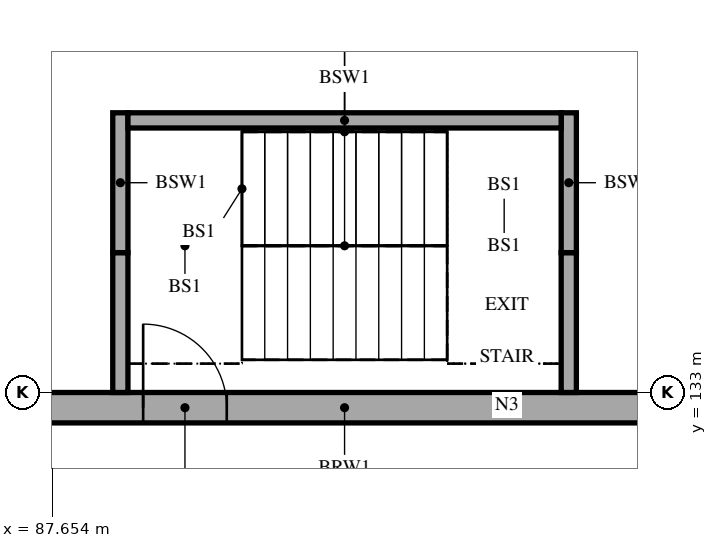
"""IFC4 building model, lengths in metres.
Left out: names, types, materials, properties, quantities, classifications, styles, units other than length and angle.
Written with IfcOpenShell. Run it as: python <this file> out.ifc"""

import sys

from ifc_helpers import new_model, si_unit, direction, frame, frame_2d, origin, place, context, subcontext, project, spatial, rectangle, extrude, element, fill, save


model = new_model("IFC4")
c1 = context("Model", 3, precision=1e-05, world=origin(), true_north=direction((0.0, 1.0)))
c2 = subcontext(c1, "Body", "Model", "MODEL_VIEW")
j1 = project(units=[si_unit("LENGTHUNIT", "METRE"), si_unit("PLANEANGLEUNIT", "RADIAN")], contexts=[c1])
p1 = place(None, origin())
s1 = spatial("IfcSite", under=j1, at=p1, CompositionType="ELEMENT")
p2 = place(p1, origin())
s2 = spatial("IfcBuilding", under=s1, at=p2, CompositionType="ELEMENT")
p3 = place(p2, frame((0.0, 0.0, -4.2)))
s3 = spatial("IfcBuildingStorey", under=s2, at=p3, CompositionType="ELEMENT", Elevation=-4.2)
p4 = place(p3, frame((87.4, 132.8, 0.0), z_axis=(0.0, 0.0, 1.0), x_axis=(1.0, 0.0, 0.0)))
e1 = element("IfcWall", 1, at=p4, inside=s3, PredefinedType="SOLIDWALL", context=c2, shape_type="SweptSolid", body=[
    extrude(rectangle(XDim=8.2, YDim=0.4, at=frame_2d((4.1, 0.0))), origin(), (0.0, 0.0, 1.0), 4.2),
])
p5 = place(p4, frame((1.45, 0.0, 0.0)))
e2 = element("IfcOpeningElement", 2, at=p5, cuts=e1, PredefinedType="OPENING", context=c2, shape_type="SweptSolid", body=[
    extrude(rectangle(XDim=1.1, YDim=2.1, at=frame_2d((0.55, 1.05))), frame((0.0, 0.21, 0.0), z_axis=(0.0, -1.0, 0.0), x_axis=(1.0, 0.0, 0.0)), (0.0, 0.0, 1.0), 0.42),
])
p6 = place(p3, frame((94.45, 133.0, 0.0), z_axis=(0.0, 0.0, 1.0), x_axis=(0.0, 1.0, 0.0)))
e3 = element("IfcWall", 3, at=p6, inside=s3, PredefinedType="SOLIDWALL", context=c2, shape_type="SweptSolid", body=[
    extrude(rectangle(XDim=1.84, YDim=0.2, at=frame_2d((0.92, 0.0))), origin(), (0.0, 0.0, 1.0), 4.2),
])
p7 = place(p3, frame((94.45, 134.84, 0.0), z_axis=(0.0, 0.0, 1.0), x_axis=(0.0, 1.0, 0.0)))
e4 = element("IfcWall", 4, at=p7, inside=s3, PredefinedType="SOLIDWALL", context=c2, shape_type="SweptSolid", body=[
    extrude(rectangle(XDim=1.84, YDim=0.2, at=frame_2d((0.92, 0.0))), origin(), (0.0, 0.0, 1.0), 4.2),
])
p8 = place(p3, frame((88.55, 133.0, 0.0), z_axis=(0.0, 0.0, 1.0), x_axis=(0.0, 1.0, 0.0)))
e5 = element("IfcWall", 5, at=p8, inside=s3, PredefinedType="SOLIDWALL", context=c2, shape_type="SweptSolid", body=[
    extrude(rectangle(XDim=1.84, YDim=0.2, at=frame_2d((0.92, 0.0))), origin(), (0.0, 0.0, 1.0), 4.2),
])
p9 = place(p3, frame((88.55, 134.84, 0.0), z_axis=(0.0, 0.0, 1.0), x_axis=(0.0, 1.0, 0.0)))
e6 = element("IfcWall", 6, at=p9, inside=s3, PredefinedType="SOLIDWALL", context=c2, shape_type="SweptSolid", body=[
    extrude(rectangle(XDim=1.84, YDim=0.2, at=frame_2d((0.92, 0.0))), origin(), (0.0, 0.0, 1.0), 4.2),
])
p10 = place(p3, frame((94.35, 136.58, 0.0), z_axis=(0.0, 0.0, 1.0), x_axis=(-1.0, 0.0, 0.0)))
e7 = element("IfcWall", 7, at=p10, inside=s3, PredefinedType="SOLIDWALL", context=c2, shape_type="SweptSolid", body=[
    extrude(rectangle(XDim=5.7, YDim=0.2, at=frame_2d((2.85, 0.0))), origin(), (0.0, 0.0, 1.0), 4.2),
])
p11 = place(p5, origin())
e8 = element("IfcDoor", 8, at=p11, inside=s3, OperationType="SINGLE_SWING_LEFT", PredefinedType="DOOR", context=c2, shape_type="SweptSolid", body=[
    extrude(rectangle(XDim=1.1, YDim=2.1, at=frame_2d((0.55, 1.05))), frame((0.0, 0.025, 0.0), z_axis=(0.0, -1.0, 0.0), x_axis=(1.0, 0.0, 0.0)), (0.0, 0.0, 1.0), 0.05),
])
fill(e2, e8)
save(model, sys.argv[1])
